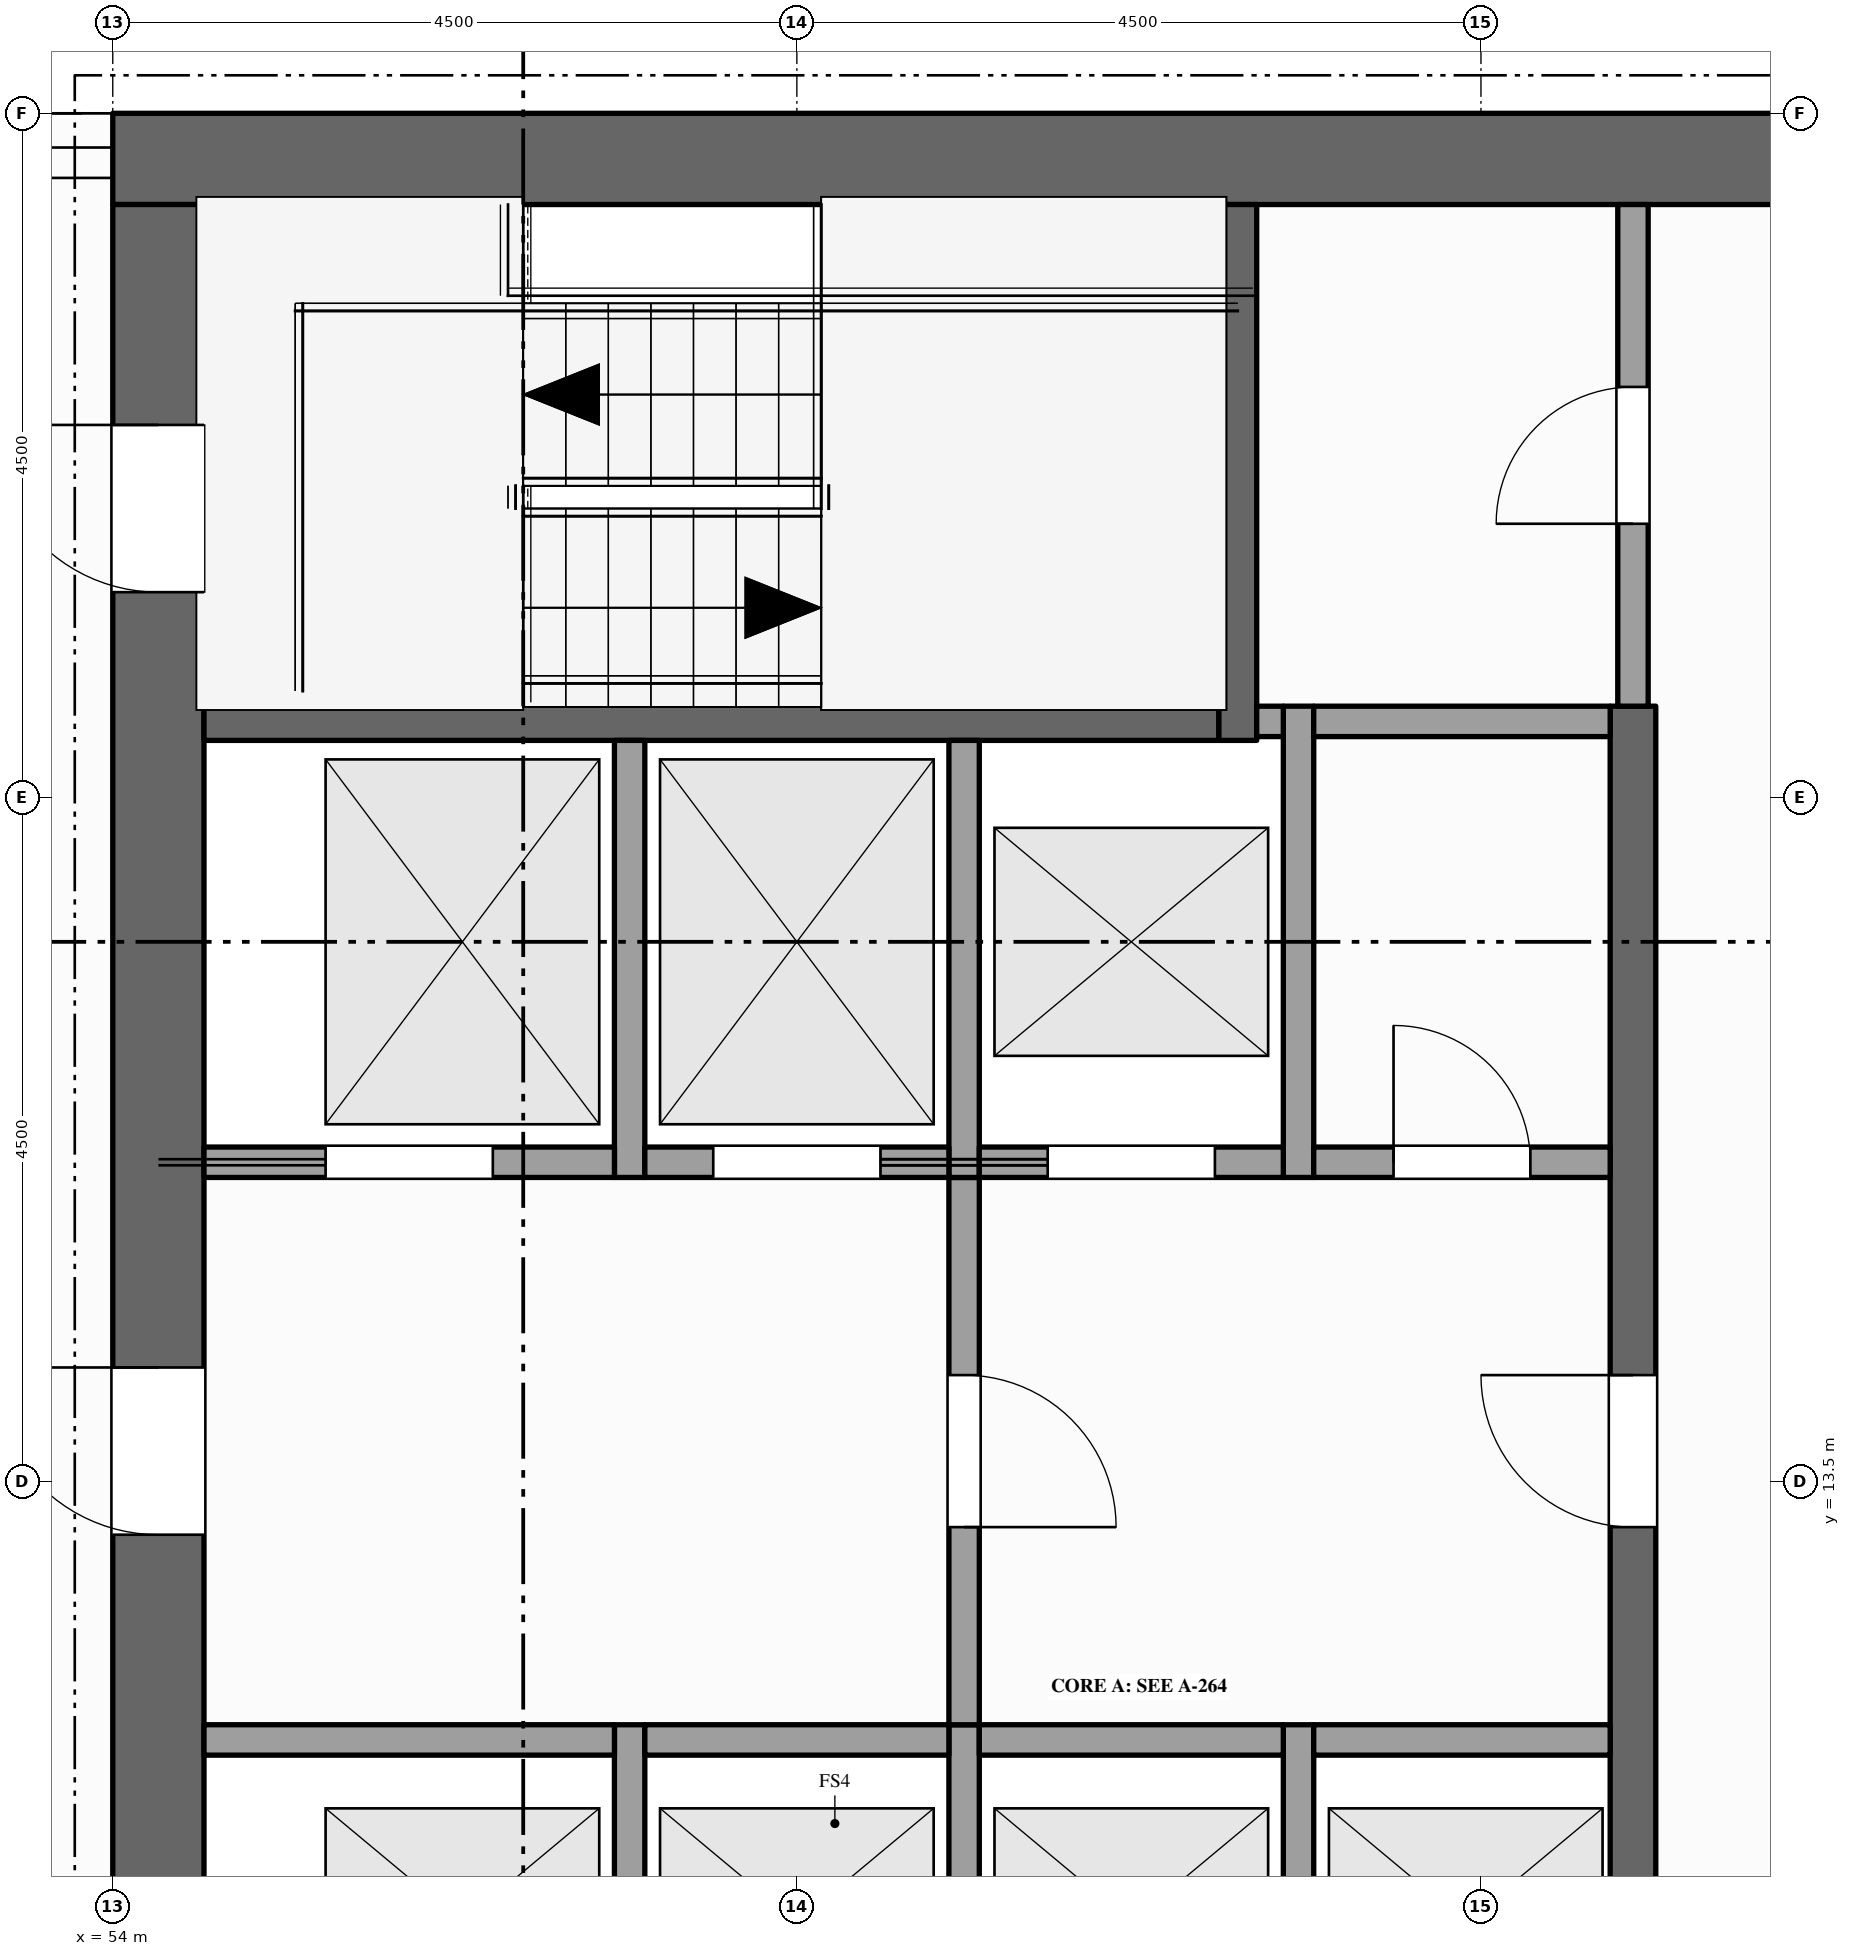
"""IFC4 building model, lengths in metres.
Left out: names, types, materials, properties, quantities, classifications, styles, units other than length and angle.
Written with IfcOpenShell. Run it as: python <this file> out.ifc"""

import sys

from ifc_helpers import new_model, si_unit, direction, frame, frame_2d, origin, place, context, subcontext, project, spatial, rectangle, extrude, element, fill, save


model = new_model("IFC4")
c1 = context("Model", 3, precision=1e-05, world=origin(), true_north=direction((0.0, 1.0)))
c2 = subcontext(c1, "Body", "Model", "MODEL_VIEW")
j1 = project(units=[si_unit("LENGTHUNIT", "METRE"), si_unit("PLANEANGLEUNIT", "RADIAN")], contexts=[c1])
p1 = place(None, origin())
s1 = spatial("IfcSite", under=j1, at=p1, CompositionType="ELEMENT")
p2 = place(p1, origin())
s2 = spatial("IfcBuilding", under=s1, at=p2, CompositionType="ELEMENT")
p3 = place(p2, frame((0.0, 0.0, 350.5)))
s3 = spatial("IfcBuildingStorey", under=s2, at=p3, CompositionType="ELEMENT", Elevation=350.5)
p4 = place(p3, frame((54.0, 22.2, -0.15), z_axis=(0.0, 0.0, 1.0), x_axis=(1.0, 0.0, 0.0)))
e1 = element("IfcWall", 1, at=p4, inside=s3, PredefinedType="SHEAR", context=c2, shape_type="SweptSolid", body=[
    extrude(rectangle(XDim=13.5, YDim=0.6, at=frame_2d((6.75, 0.0))), origin(), (0.0, 0.0, 1.0), 5.0),
])
p5 = place(p3, frame((54.3, 0.6, -0.15), z_axis=(0.0, 0.0, 1.0), x_axis=(0.0, 1.0, 0.0)))
e2 = element("IfcWall", 2, at=p5, inside=s3, PredefinedType="SHEAR", context=c2, shape_type="SweptSolid", body=[
    extrude(rectangle(XDim=21.3, YDim=0.6, at=frame_2d((10.65, 0.0))), origin(), (0.0, 0.0, 1.0), 5.0),
])
p6 = place(p5, frame((6.5, 0.0, 0.15)))
e3 = element("IfcOpeningElement", 3, at=p6, cuts=e2, PredefinedType="OPENING", context=c2, shape_type="SweptSolid", body=[
    extrude(rectangle(XDim=1.8, YDim=2.1, at=frame_2d((0.9, 1.05))), frame((0.0, 0.31, 0.0), z_axis=(0.0, -1.0, 0.0), x_axis=(1.0, 0.0, 0.0)), (0.0, 0.0, 1.0), 0.62),
])
p7 = place(p5, frame((12.55, 0.0, 0.15)))
e4 = element("IfcOpeningElement", 4, at=p7, cuts=e2, PredefinedType="OPENING", context=c2, shape_type="SweptSolid", body=[
    extrude(rectangle(XDim=1.1, YDim=2.1, at=frame_2d((0.55, 1.05))), frame((0.0, 0.31, 0.0), z_axis=(0.0, -1.0, 0.0), x_axis=(1.0, 0.0, 0.0)), (0.0, 0.0, 1.0), 0.62),
])
p8 = place(p5, frame((1.55, 0.0, 0.15)))
e5 = element("IfcOpeningElement", 5, at=p8, cuts=e2, PredefinedType="OPENING", context=c2, shape_type="SweptSolid", body=[
    extrude(rectangle(XDim=1.1, YDim=2.1, at=frame_2d((0.55, 1.05))), frame((0.0, 0.31, 0.0), z_axis=(0.0, -1.0, 0.0), x_axis=(1.0, 0.0, 0.0)), (0.0, 0.0, 1.0), 0.62),
])
p9 = place(p5, frame((18.75, 0.0, 0.15)))
e6 = element("IfcOpeningElement", 6, at=p9, cuts=e2, PredefinedType="OPENING", context=c2, shape_type="SweptSolid", body=[
    extrude(rectangle(XDim=1.1, YDim=2.1, at=frame_2d((0.55, 1.05))), frame((0.0, 0.31, 0.0), z_axis=(0.0, -1.0, 0.0), x_axis=(1.0, 0.0, 0.0)), (0.0, 0.0, 1.0), 0.62),
])
p10 = place(p3, frame((57.4, 9.3, 0.0), z_axis=(0.0, 0.0, 1.0), x_axis=(0.0, 1.0, 0.0)))
e7 = element("IfcWall", 7, at=p10, inside=s3, PredefinedType="SOLIDWALL", context=c2, shape_type="SweptSolid", body=[
    extrude(rectangle(XDim=2.6, YDim=0.2, at=frame_2d((1.3, 0.0))), origin(), (0.0, 0.0, 1.0), 4.75),
])
p11 = place(p3, frame((57.4, 15.5, 0.0), z_axis=(0.0, 0.0, 1.0), x_axis=(0.0, 1.0, 0.0)))
e8 = element("IfcWall", 8, at=p11, inside=s3, PredefinedType="SOLIDWALL", context=c2, shape_type="SweptSolid", body=[
    extrude(rectangle(XDim=2.875, YDim=0.2, at=frame_2d((1.438, 0.0))), origin(), (0.0, 0.0, 1.0), 4.75),
])
p12 = place(p3, frame((59.6, 9.3, 0.0), z_axis=(0.0, 0.0, 1.0), x_axis=(0.0, 1.0, 0.0)))
e9 = element("IfcWall", 9, at=p12, inside=s3, PredefinedType="SOLIDWALL", context=c2, shape_type="SweptSolid", body=[
    extrude(rectangle(XDim=2.6, YDim=0.2, at=frame_2d((1.3, 0.0))), origin(), (0.0, 0.0, 1.0), 4.75),
])
p13 = place(p3, frame((59.6, 11.9, 0.0), z_axis=(0.0, 0.0, 1.0), x_axis=(0.0, 1.0, 0.0)))
e10 = element("IfcWall", 10, at=p13, inside=s3, PredefinedType="PARTITIONING", context=c2, shape_type="SweptSolid", body=[
    extrude(rectangle(XDim=3.6, YDim=0.2, at=frame_2d((1.8, 0.0))), origin(), (0.0, 0.0, 1.0), 4.75),
])
p14 = place(p13, frame((1.3, 0.0, 0.0)))
e11 = element("IfcOpeningElement", 11, at=p14, cuts=e10, PredefinedType="OPENING", context=c2, shape_type="SweptSolid", body=[
    extrude(rectangle(XDim=1.0, YDim=2.1, at=frame_2d((0.5, 1.05))), frame((0.0, 0.11, 0.0), z_axis=(0.0, -1.0, 0.0), x_axis=(1.0, 0.0, 0.0)), (0.0, 0.0, 1.0), 0.22),
])
p15 = place(p3, frame((59.6, 15.5, 0.0), z_axis=(0.0, 0.0, 1.0), x_axis=(0.0, 1.0, 0.0)))
e12 = element("IfcWall", 12, at=p15, inside=s3, PredefinedType="SOLIDWALL", context=c2, shape_type="SweptSolid", body=[
    extrude(rectangle(XDim=2.875, YDim=0.2, at=frame_2d((1.438, 0.0))), origin(), (0.0, 0.0, 1.0), 4.75),
])
p16 = place(p3, frame((61.4, 18.375, 0.0), z_axis=(0.0, 0.0, 1.0), x_axis=(0.0, 1.0, 0.0)))
e13 = element("IfcWall", 13, at=p16, inside=s3, PredefinedType="SHEAR", context=c2, shape_type="SweptSolid", body=[
    extrude(rectangle(XDim=3.525, YDim=0.25, at=frame_2d((1.762, 0.0))), origin(), (0.0, 0.0, 1.0), 4.75),
])
p17 = place(p3, frame((61.8, 9.3, 0.0), z_axis=(0.0, 0.0, 1.0), x_axis=(0.0, 1.0, 0.0)))
e14 = element("IfcWall", 14, at=p17, inside=s3, PredefinedType="SOLIDWALL", context=c2, shape_type="SweptSolid", body=[
    extrude(rectangle(XDim=2.6, YDim=0.2, at=frame_2d((1.3, 0.0))), origin(), (0.0, 0.0, 1.0), 4.75),
])
p18 = place(p3, frame((61.8, 15.5, 0.0), z_axis=(0.0, 0.0, 1.0), x_axis=(0.0, 1.0, 0.0)))
e15 = element("IfcWall", 15, at=p18, inside=s3, PredefinedType="SOLIDWALL", context=c2, shape_type="SweptSolid", body=[
    extrude(rectangle(XDim=3.1, YDim=0.2, at=frame_2d((1.55, 0.0))), origin(), (0.0, 0.0, 1.0), 4.75),
])
p19 = place(p3, frame((64.0, 4.075, 0.0), z_axis=(0.0, 0.0, 1.0), x_axis=(0.0, 1.0, 0.0)))
e16 = element("IfcWall", 16, at=p19, inside=s3, PredefinedType="SHEAR", context=c2, shape_type="SweptSolid", body=[
    extrude(rectangle(XDim=14.525, YDim=0.3, at=frame_2d((7.263, 0.0))), origin(), (0.0, 0.0, 1.0), 4.75),
])
p20 = place(p19, frame((3.425, 0.0, 0.0)))
e17 = element("IfcOpeningElement", 17, at=p20, cuts=e16, PredefinedType="OPENING", context=c2, shape_type="SweptSolid", body=[
    extrude(rectangle(XDim=1.0, YDim=2.1, at=frame_2d((0.5, 1.05))), frame((0.0, 0.16, 0.0), z_axis=(0.0, -1.0, 0.0), x_axis=(1.0, 0.0, 0.0)), (0.0, 0.0, 1.0), 0.32),
])
p21 = place(p19, frame((9.125, 0.0, 0.0)))
e18 = element("IfcOpeningElement", 18, at=p21, cuts=e16, PredefinedType="OPENING", context=c2, shape_type="SweptSolid", body=[
    extrude(rectangle(XDim=1.0, YDim=2.1, at=frame_2d((0.5, 1.05))), frame((0.0, 0.16, 0.0), z_axis=(0.0, -1.0, 0.0), x_axis=(1.0, 0.0, 0.0)), (0.0, 0.0, 1.0), 0.32),
])
p22 = place(p3, frame((64.0, 18.6, 0.0), z_axis=(0.0, 0.0, 1.0), x_axis=(0.0, 1.0, 0.0)))
e19 = element("IfcWall", 19, at=p22, inside=s3, PredefinedType="PARTITIONING", context=c2, shape_type="SweptSolid", body=[
    extrude(rectangle(XDim=3.3, YDim=0.2, at=frame_2d((1.65, 0.0))), origin(), (0.0, 0.0, 1.0), 4.75),
])
p23 = place(p22, frame((1.2, 0.0, 0.0)))
e20 = element("IfcOpeningElement", 20, at=p23, cuts=e19, PredefinedType="OPENING", context=c2, shape_type="SweptSolid", body=[
    extrude(rectangle(XDim=0.9, YDim=2.1, at=frame_2d((0.45, 1.05))), frame((0.0, 0.11, 0.0), z_axis=(0.0, -1.0, 0.0), x_axis=(1.0, 0.0, 0.0)), (0.0, 0.0, 1.0), 0.22),
])
p24 = place(p3, frame((54.6, 11.8, 0.0), z_axis=(0.0, 0.0, 1.0), x_axis=(1.0, 0.0, 0.0)))
e21 = element("IfcWall", 21, at=p24, inside=s3, PredefinedType="SOLIDWALL", context=c2, shape_type="SweptSolid", body=[
    extrude(rectangle(XDim=2.7, YDim=0.2, at=frame_2d((1.35, 0.0))), origin(), (0.0, 0.0, 1.0), 4.75),
])
for number, where, z_axis, x_axis in (
    (22, (57.5, 11.8, 0.0), (0.0, 0.0, 1.0), (1.0, 0.0, 0.0)),
    (23, (59.7, 11.8, 0.0), (0.0, 0.0, 1.0), (1.0, 0.0, 0.0)),
):
    element("IfcWall", number, at=place(p3, frame(where, z_axis=z_axis, x_axis=x_axis)), inside=s3, PredefinedType="SOLIDWALL", context=c2, shape_type="SweptSolid", body=[
        extrude(rectangle(XDim=2.0, YDim=0.2, at=frame_2d((1.0, 0.0))), origin(), (0.0, 0.0, 1.0), 4.75),
    ])
p25 = place(p3, frame((61.9, 11.8, 0.0), z_axis=(0.0, 0.0, 1.0), x_axis=(1.0, 0.0, 0.0)))
e24 = element("IfcWall", 24, at=p25, inside=s3, PredefinedType="SOLIDWALL", context=c2, shape_type="SweptSolid", body=[
    extrude(rectangle(XDim=1.95, YDim=0.2, at=frame_2d((0.975, 0.0))), origin(), (0.0, 0.0, 1.0), 4.75),
])
p26 = place(p3, frame((54.6, 15.6, 0.0), z_axis=(0.0, 0.0, 1.0), x_axis=(1.0, 0.0, 0.0)))
e25 = element("IfcWall", 25, at=p26, inside=s3, PredefinedType="SOLIDWALL", context=c2, shape_type="SweptSolid", body=[
    extrude(rectangle(XDim=2.7, YDim=0.2, at=frame_2d((1.35, 0.0))), origin(), (0.0, 0.0, 1.0), 4.75),
])
p27 = place(p26, frame((0.8, 0.0, 0.012)))
e26 = element("IfcOpeningElement", 26, at=p27, cuts=e25, PredefinedType="OPENING", context=c2, shape_type="SweptSolid", body=[
    extrude(rectangle(XDim=1.1, YDim=2.1, at=frame_2d((0.55, 1.05))), frame((0.0, 0.11, 0.0), z_axis=(0.0, -1.0, 0.0), x_axis=(1.0, 0.0, 0.0)), (0.0, 0.0, 1.0), 0.22),
])
p28 = place(p3, frame((57.5, 15.6, 0.0), z_axis=(0.0, 0.0, 1.0), x_axis=(1.0, 0.0, 0.0)))
e27 = element("IfcWall", 27, at=p28, inside=s3, PredefinedType="SOLIDWALL", context=c2, shape_type="SweptSolid", body=[
    extrude(rectangle(XDim=2.0, YDim=0.2, at=frame_2d((1.0, 0.0))), origin(), (0.0, 0.0, 1.0), 4.75),
])
p29 = place(p28, frame((0.45, 0.0, 0.012)))
e28 = element("IfcOpeningElement", 28, at=p29, cuts=e27, PredefinedType="OPENING", context=c2, shape_type="SweptSolid", body=[
    extrude(rectangle(XDim=1.1, YDim=2.1, at=frame_2d((0.55, 1.05))), frame((0.0, 0.11, 0.0), z_axis=(0.0, -1.0, 0.0), x_axis=(1.0, 0.0, 0.0)), (0.0, 0.0, 1.0), 0.22),
])
p30 = place(p3, frame((59.7, 15.6, 0.0), z_axis=(0.0, 0.0, 1.0), x_axis=(1.0, 0.0, 0.0)))
e29 = element("IfcWall", 29, at=p30, inside=s3, PredefinedType="SOLIDWALL", context=c2, shape_type="SweptSolid", body=[
    extrude(rectangle(XDim=2.0, YDim=0.2, at=frame_2d((1.0, 0.0))), origin(), (0.0, 0.0, 1.0), 4.75),
])
p31 = place(p30, frame((0.45, 0.0, 0.012)))
e30 = element("IfcOpeningElement", 30, at=p31, cuts=e29, PredefinedType="OPENING", context=c2, shape_type="SweptSolid", body=[
    extrude(rectangle(XDim=1.1, YDim=2.1, at=frame_2d((0.55, 1.05))), frame((0.0, 0.11, 0.0), z_axis=(0.0, -1.0, 0.0), x_axis=(1.0, 0.0, 0.0)), (0.0, 0.0, 1.0), 0.22),
])
p32 = place(p3, frame((61.9, 15.6, 0.0), z_axis=(0.0, 0.0, 1.0), x_axis=(1.0, 0.0, 0.0)))
e31 = element("IfcWall", 31, at=p32, inside=s3, PredefinedType="PARTITIONING", context=c2, shape_type="SweptSolid", body=[
    extrude(rectangle(XDim=1.95, YDim=0.2, at=frame_2d((0.975, 0.0))), origin(), (0.0, 0.0, 1.0), 4.75),
])
p33 = place(p32, frame((0.525, 0.0, 0.0)))
e32 = element("IfcOpeningElement", 32, at=p33, cuts=e31, PredefinedType="OPENING", context=c2, shape_type="SweptSolid", body=[
    extrude(rectangle(XDim=0.9, YDim=2.1, at=frame_2d((0.45, 1.05))), frame((0.0, 0.11, 0.0), z_axis=(0.0, -1.0, 0.0), x_axis=(1.0, 0.0, 0.0)), (0.0, 0.0, 1.0), 0.22),
])
p34 = place(p3, frame((54.6, 18.5, 0.0), z_axis=(0.0, 0.0, 1.0), x_axis=(1.0, 0.0, 0.0)))
e33 = element("IfcWall", 33, at=p34, inside=s3, PredefinedType="SHEAR", context=c2, shape_type="SweptSolid", body=[
    extrude(rectangle(XDim=6.675, YDim=0.25, at=frame_2d((3.337, 0.0))), origin(), (0.0, 0.0, 1.0), 4.75),
])
p35 = place(p3, frame((61.525, 18.5, 0.0), z_axis=(0.0, 0.0, 1.0), x_axis=(1.0, 0.0, 0.0)))
e34 = element("IfcWall", 34, at=p35, inside=s3, PredefinedType="SOLIDWALL", context=c2, shape_type="SweptSolid", body=[
    extrude(rectangle(XDim=0.175, YDim=0.2, at=frame_2d((0.087, 0.0))), origin(), (0.0, 0.0, 1.0), 4.75),
])
p36 = place(p3, frame((61.9, 18.5, 0.0), z_axis=(0.0, 0.0, 1.0), x_axis=(1.0, 0.0, 0.0)))
e35 = element("IfcWall", 35, at=p36, inside=s3, PredefinedType="PARTITIONING", context=c2, shape_type="SweptSolid", body=[
    extrude(rectangle(XDim=1.95, YDim=0.2, at=frame_2d((0.975, 0.0))), origin(), (0.0, 0.0, 1.0), 4.75),
])
p37 = place(p27, origin())
e36 = element("IfcDoor", 36, at=p37, inside=s3, OperationType="SLIDING_TO_LEFT", PredefinedType="DOOR", context=c2, shape_type="SweptSolid", body=[
    extrude(rectangle(XDim=1.1, YDim=2.1, at=frame_2d((0.55, 1.05))), frame((0.0, 0.025, 0.0), z_axis=(0.0, -1.0, 0.0), x_axis=(1.0, 0.0, 0.0)), (0.0, 0.0, 1.0), 0.05),
])
fill(e26, e36)
p38 = place(p29, origin())
e37 = element("IfcDoor", 37, at=p38, inside=s3, OperationType="SLIDING_TO_RIGHT", PredefinedType="DOOR", context=c2, shape_type="SweptSolid", body=[
    extrude(rectangle(XDim=1.1, YDim=2.1, at=frame_2d((0.55, 1.05))), frame((0.0, 0.025, 0.0), z_axis=(0.0, -1.0, 0.0), x_axis=(1.0, 0.0, 0.0)), (0.0, 0.0, 1.0), 0.05),
])
fill(e28, e37)
p39 = place(p31, origin())
e38 = element("IfcDoor", 38, at=p39, inside=s3, OperationType="SLIDING_TO_LEFT", PredefinedType="DOOR", context=c2, shape_type="SweptSolid", body=[
    extrude(rectangle(XDim=1.1, YDim=2.1, at=frame_2d((0.55, 1.05))), frame((0.0, 0.025, 0.0), z_axis=(0.0, -1.0, 0.0), x_axis=(1.0, 0.0, 0.0)), (0.0, 0.0, 1.0), 0.05),
])
fill(e30, e38)
p40 = place(p7, origin())
e39 = element("IfcDoor", 39, at=p40, inside=s3, OperationType="SINGLE_SWING_RIGHT", PredefinedType="DOOR", context=c2, shape_type="SweptSolid", body=[
    extrude(rectangle(XDim=1.1, YDim=2.1, at=frame_2d((0.55, 1.05))), frame((0.0, 0.025, 0.0), z_axis=(0.0, -1.0, 0.0), x_axis=(1.0, 0.0, 0.0)), (0.0, 0.0, 1.0), 0.05),
])
fill(e4, e39)
p41 = place(p14, origin())
e40 = element("IfcDoor", 40, at=p41, inside=s3, OperationType="SINGLE_SWING_LEFT", PredefinedType="DOOR", context=c2, shape_type="SweptSolid", body=[
    extrude(rectangle(XDim=1.0, YDim=2.1, at=frame_2d((0.5, 1.05))), frame((0.0, 0.025, 0.0), z_axis=(0.0, -1.0, 0.0), x_axis=(1.0, 0.0, 0.0)), (0.0, 0.0, 1.0), 0.05),
])
fill(e11, e40)
p42 = place(p21, origin())
e41 = element("IfcDoor", 41, at=p42, inside=s3, OperationType="SINGLE_SWING_RIGHT", PredefinedType="DOOR", context=c2, shape_type="SweptSolid", body=[
    extrude(rectangle(XDim=1.0, YDim=2.1, at=frame_2d((0.5, 1.05))), frame((0.0, 0.025, 0.0), z_axis=(0.0, -1.0, 0.0), x_axis=(1.0, 0.0, 0.0)), (0.0, 0.0, 1.0), 0.05),
])
fill(e18, e41)
p43 = place(p9, origin())
e42 = element("IfcDoor", 42, at=p43, inside=s3, OperationType="SINGLE_SWING_RIGHT", PredefinedType="DOOR", context=c2, shape_type="SweptSolid", body=[
    extrude(rectangle(XDim=1.1, YDim=2.1, at=frame_2d((0.55, 1.05))), frame((0.0, 0.025, 0.0), z_axis=(0.0, -1.0, 0.0), x_axis=(1.0, 0.0, 0.0)), (0.0, 0.0, 1.0), 0.05),
])
fill(e6, e42)
p44 = place(p23, origin())
e43 = element("IfcDoor", 43, at=p44, inside=s3, OperationType="SINGLE_SWING_LEFT", PredefinedType="DOOR", context=c2, shape_type="SweptSolid", body=[
    extrude(rectangle(XDim=0.9, YDim=2.1, at=frame_2d((0.45, 1.05))), frame((0.0, 0.025, 0.0), z_axis=(0.0, -1.0, 0.0), x_axis=(1.0, 0.0, 0.0)), (0.0, 0.0, 1.0), 0.05),
])
fill(e20, e43)
p45 = place(p33, origin())
e44 = element("IfcDoor", 44, at=p45, inside=s3, OperationType="SINGLE_SWING_LEFT", PredefinedType="DOOR", context=c2, shape_type="SweptSolid", body=[
    extrude(rectangle(XDim=0.9, YDim=2.1, at=frame_2d((0.45, 1.05))), frame((0.0, 0.025, 0.0), z_axis=(0.0, -1.0, 0.0), x_axis=(1.0, 0.0, 0.0)), (0.0, 0.0, 1.0), 0.05),
])
fill(e32, e44)
save(model, sys.argv[1])
